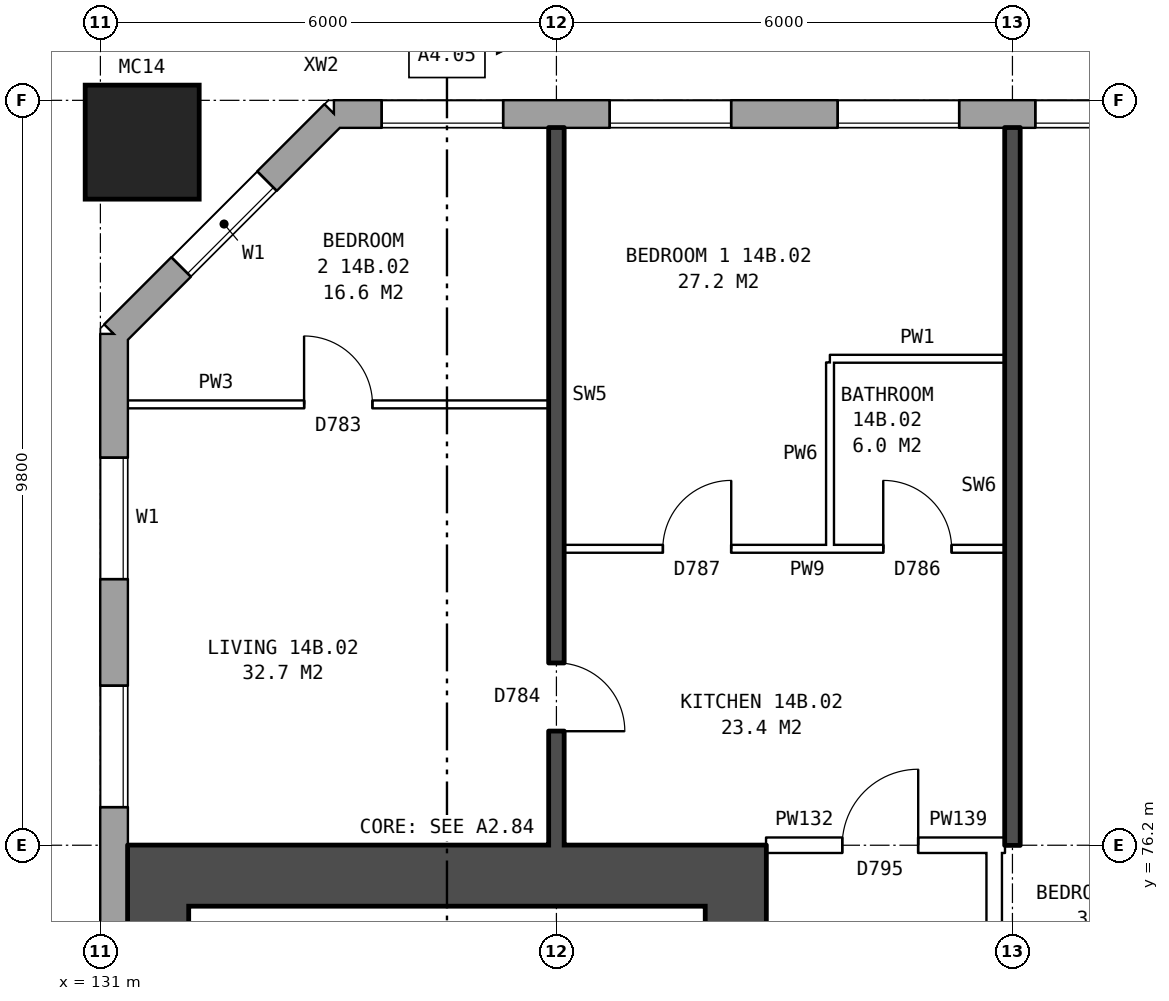
"""IFC4 building model, lengths in metres.
Left out: names, types, materials, properties, quantities, classifications, styles, units other than length and angle.
Written with IfcOpenShell. Run it as: python <this file> out.ifc"""

import sys

from ifc_helpers import new_model, si_unit, direction, frame, frame_2d, origin, origin_2d, place, context, subcontext, project, spatial, rectangle, hollow_rectangle, extrude, element, fill, save


model = new_model("IFC4")
c1 = context("Model", 3, precision=1e-05, world=origin(), true_north=direction((0.0, 1.0)))
c2 = subcontext(c1, "Body", "Model", "MODEL_VIEW")
j1 = project(units=[si_unit("LENGTHUNIT", "METRE"), si_unit("PLANEANGLEUNIT", "RADIAN")], contexts=[c1])
p1 = place(None, origin())
s1 = spatial("IfcSite", under=j1, at=p1, CompositionType="ELEMENT")
p2 = place(p1, origin())
s2 = spatial("IfcBuilding", under=s1, at=p2, CompositionType="ELEMENT")
p3 = place(p2, frame((0.0, 0.0, 53.6)))
s3 = spatial("IfcBuildingStorey", under=s2, at=p3, CompositionType="ELEMENT", Elevation=53.6)
p4 = place(p3, frame((131.55, 85.45, 0.0), z_axis=(0.0, 0.0, 1.0), x_axis=(1.0, 0.0, 0.0)))
e1 = element("IfcColumn", 1, at=p4, inside=s3, PredefinedType="COLUMN", context=c2, shape_type="SweptSolid", body=[
    extrude(hollow_rectangle(XDim=1.5, YDim=1.5, WallThickness=0.08, at=origin_2d()), origin(), (0.0, 0.0, 1.0), 3.1),
])
p5 = place(p3, frame((173.425, 85.82, 0.0), z_axis=(0.0, 0.0, 1.0), x_axis=(-1.0, 0.0, 0.0)))
e2 = element("IfcWall", 2, at=p5, inside=s3, PredefinedType="STANDARD", context=c2, shape_type="SweptSolid", body=[
    extrude(rectangle(XDim=39.351, YDim=0.36, at=frame_2d((19.675, 0.0))), origin(), (0.0, 0.0, 1.0), 2.85),
])
p6 = place(p5, frame((1.125, 0.0, 0.8)))
e3 = element("IfcOpeningElement", 3, at=p6, cuts=e2, PredefinedType="OPENING", context=c2, shape_type="SweptSolid", body=[
    extrude(rectangle(XDim=1.6, YDim=1.8, at=frame_2d((0.8, 0.9))), frame((0.0, 0.19, 0.0), z_axis=(0.0, -1.0, 0.0), x_axis=(1.0, 0.0, 0.0)), (0.0, 0.0, 1.0), 0.38),
])
p7 = place(p5, frame((4.125, 0.0, 0.8)))
e4 = element("IfcOpeningElement", 4, at=p7, cuts=e2, PredefinedType="OPENING", context=c2, shape_type="SweptSolid", body=[
    extrude(rectangle(XDim=1.6, YDim=1.8, at=frame_2d((0.8, 0.9))), frame((0.0, 0.19, 0.0), z_axis=(0.0, -1.0, 0.0), x_axis=(1.0, 0.0, 0.0)), (0.0, 0.0, 1.0), 0.38),
])
p8 = place(p5, frame((7.125, 0.0, 0.8)))
e5 = element("IfcOpeningElement", 5, at=p8, cuts=e2, PredefinedType="OPENING", context=c2, shape_type="SweptSolid", body=[
    extrude(rectangle(XDim=1.6, YDim=1.8, at=frame_2d((0.8, 0.9))), frame((0.0, 0.19, 0.0), z_axis=(0.0, -1.0, 0.0), x_axis=(1.0, 0.0, 0.0)), (0.0, 0.0, 1.0), 0.38),
])
p9 = place(p5, frame((9.625, 0.0, 1.65)))
e6 = element("IfcOpeningElement", 6, at=p9, cuts=e2, PredefinedType="OPENING", context=c2, shape_type="SweptSolid", body=[
    extrude(rectangle(XDim=0.6, YDim=0.9, at=frame_2d((0.3, 0.45))), frame((0.0, 0.19, 0.0), z_axis=(0.0, -1.0, 0.0), x_axis=(1.0, 0.0, 0.0)), (0.0, 0.0, 1.0), 0.38),
])
p10 = place(p5, frame((13.125, 0.0, 0.8)))
e7 = element("IfcOpeningElement", 7, at=p10, cuts=e2, PredefinedType="OPENING", context=c2, shape_type="SweptSolid", body=[
    extrude(rectangle(XDim=1.6, YDim=1.8, at=frame_2d((0.8, 0.9))), frame((0.0, 0.19, 0.0), z_axis=(0.0, -1.0, 0.0), x_axis=(1.0, 0.0, 0.0)), (0.0, 0.0, 1.0), 0.38),
])
p11 = place(p5, frame((16.125, 0.0, 0.8)))
e8 = element("IfcOpeningElement", 8, at=p11, cuts=e2, PredefinedType="OPENING", context=c2, shape_type="SweptSolid", body=[
    extrude(rectangle(XDim=1.6, YDim=1.8, at=frame_2d((0.8, 0.9))), frame((0.0, 0.19, 0.0), z_axis=(0.0, -1.0, 0.0), x_axis=(1.0, 0.0, 0.0)), (0.0, 0.0, 1.0), 0.38),
])
p12 = place(p5, frame((19.125, 0.0, 0.8)))
e9 = element("IfcOpeningElement", 9, at=p12, cuts=e2, PredefinedType="OPENING", context=c2, shape_type="SweptSolid", body=[
    extrude(rectangle(XDim=1.6, YDim=1.8, at=frame_2d((0.8, 0.9))), frame((0.0, 0.19, 0.0), z_axis=(0.0, -1.0, 0.0), x_axis=(1.0, 0.0, 0.0)), (0.0, 0.0, 1.0), 0.38),
])
p13 = place(p5, frame((22.125, 0.0, 0.8)))
e10 = element("IfcOpeningElement", 10, at=p13, cuts=e2, PredefinedType="OPENING", context=c2, shape_type="SweptSolid", body=[
    extrude(rectangle(XDim=1.6, YDim=1.8, at=frame_2d((0.8, 0.9))), frame((0.0, 0.19, 0.0), z_axis=(0.0, -1.0, 0.0), x_axis=(1.0, 0.0, 0.0)), (0.0, 0.0, 1.0), 0.38),
])
p14 = place(p5, frame((25.125, 0.0, 0.8)))
e11 = element("IfcOpeningElement", 11, at=p14, cuts=e2, PredefinedType="OPENING", context=c2, shape_type="SweptSolid", body=[
    extrude(rectangle(XDim=1.6, YDim=1.8, at=frame_2d((0.8, 0.9))), frame((0.0, 0.19, 0.0), z_axis=(0.0, -1.0, 0.0), x_axis=(1.0, 0.0, 0.0)), (0.0, 0.0, 1.0), 0.38),
])
p15 = place(p5, frame((27.575, 0.0, 0.15)))
e12 = element("IfcOpeningElement", 12, at=p15, cuts=e2, PredefinedType="OPENING", context=c2, shape_type="SweptSolid", body=[
    extrude(rectangle(XDim=1.0, YDim=0.9, at=frame_2d((0.5, 0.45))), frame((0.0, 0.19, 0.0), z_axis=(0.0, -1.0, 0.0), x_axis=(1.0, 0.0, 0.0)), (0.0, 0.0, 1.0), 0.38),
])
p16 = place(p5, frame((31.125, 0.0, 0.8)))
e13 = element("IfcOpeningElement", 13, at=p16, cuts=e2, PredefinedType="OPENING", context=c2, shape_type="SweptSolid", body=[
    extrude(rectangle(XDim=1.6, YDim=1.8, at=frame_2d((0.8, 0.9))), frame((0.0, 0.19, 0.0), z_axis=(0.0, -1.0, 0.0), x_axis=(1.0, 0.0, 0.0)), (0.0, 0.0, 1.0), 0.38),
])
p17 = place(p5, frame((34.125, 0.0, 0.8)))
e14 = element("IfcOpeningElement", 14, at=p17, cuts=e2, PredefinedType="OPENING", context=c2, shape_type="SweptSolid", body=[
    extrude(rectangle(XDim=1.6, YDim=1.8, at=frame_2d((0.8, 0.9))), frame((0.0, 0.19, 0.0), z_axis=(0.0, -1.0, 0.0), x_axis=(1.0, 0.0, 0.0)), (0.0, 0.0, 1.0), 0.38),
])
p18 = place(p5, frame((37.125, 0.0, 0.8)))
e15 = element("IfcOpeningElement", 15, at=p18, cuts=e2, PredefinedType="OPENING", context=c2, shape_type="SweptSolid", body=[
    extrude(rectangle(XDim=1.6, YDim=1.8, at=frame_2d((0.8, 0.9))), frame((0.0, 0.19, 0.0), z_axis=(0.0, -1.0, 0.0), x_axis=(1.0, 0.0, 0.0)), (0.0, 0.0, 1.0), 0.38),
])
p19 = place(p5, frame((10.975, 0.0, 0.35)))
e16 = element("IfcOpeningElement", 16, at=p19, cuts=e2, PredefinedType="OPENING", context=c2, shape_type="SweptSolid", body=[
    extrude(rectangle(XDim=1.2, YDim=0.9, at=frame_2d((0.6, 0.45))), frame((0.0, 0.19, 0.0), z_axis=(0.0, -1.0, 0.0), x_axis=(1.0, 0.0, 0.0)), (0.0, 0.0, 1.0), 0.38),
])
p20 = place(p5, frame((29.125, 0.0, 1.65)))
e17 = element("IfcOpeningElement", 17, at=p20, cuts=e2, PredefinedType="OPENING", context=c2, shape_type="SweptSolid", body=[
    extrude(rectangle(XDim=1.0, YDim=0.9, at=frame_2d((0.5, 0.45))), frame((0.0, 0.19, 0.0), z_axis=(0.0, -1.0, 0.0), x_axis=(1.0, 0.0, 0.0)), (0.0, 0.0, 1.0), 0.38),
])
p21 = place(p3, frame((134.075, 85.82, 0.0), z_axis=(0.0, 0.0, 1.0), x_axis=(-0.707106781187, -0.707106781187, 0.0)))
e18 = element("IfcWall", 18, at=p21, inside=s3, PredefinedType="STANDARD", context=c2, shape_type="SweptSolid", body=[
    extrude(rectangle(XDim=4.094, YDim=0.36, at=frame_2d((2.047, 0.0))), origin(), (0.0, 0.0, 1.0), 2.85),
])
p22 = place(p21, frame((1.247, 0.0, 0.8)))
e19 = element("IfcOpeningElement", 19, at=p22, cuts=e18, PredefinedType="OPENING", context=c2, shape_type="SweptSolid", body=[
    extrude(rectangle(XDim=1.6, YDim=1.8, at=frame_2d((0.8, 0.9))), frame((0.0, 0.19, 0.0), z_axis=(0.0, -1.0, 0.0), x_axis=(1.0, 0.0, 0.0)), (0.0, 0.0, 1.0), 0.38),
])
p23 = place(p3, frame((131.18, 82.925, 0.0), z_axis=(0.0, 0.0, 1.0), x_axis=(0.0, -1.0, 0.0)))
e20 = element("IfcWall", 20, at=p23, inside=s3, PredefinedType="STANDARD", context=c2, shape_type="SweptSolid", body=[
    extrude(rectangle(XDim=25.851, YDim=0.36, at=frame_2d((12.925, 0.0))), origin(), (0.0, 0.0, 1.0), 2.85),
])
p24 = place(p23, frame((1.625, 0.0, 0.8)))
e21 = element("IfcOpeningElement", 21, at=p24, cuts=e20, PredefinedType="OPENING", context=c2, shape_type="SweptSolid", body=[
    extrude(rectangle(XDim=1.6, YDim=1.8, at=frame_2d((0.8, 0.9))), frame((0.0, 0.19, 0.0), z_axis=(0.0, -1.0, 0.0), x_axis=(1.0, 0.0, 0.0)), (0.0, 0.0, 1.0), 0.38),
])
p25 = place(p23, frame((4.625, 0.0, 0.8)))
e22 = element("IfcOpeningElement", 22, at=p25, cuts=e20, PredefinedType="OPENING", context=c2, shape_type="SweptSolid", body=[
    extrude(rectangle(XDim=1.6, YDim=1.8, at=frame_2d((0.8, 0.9))), frame((0.0, 0.19, 0.0), z_axis=(0.0, -1.0, 0.0), x_axis=(1.0, 0.0, 0.0)), (0.0, 0.0, 1.0), 0.38),
])
p26 = place(p23, frame((19.625, 0.0, 0.8)))
e23 = element("IfcOpeningElement", 23, at=p26, cuts=e20, PredefinedType="OPENING", context=c2, shape_type="SweptSolid", body=[
    extrude(rectangle(XDim=1.6, YDim=1.8, at=frame_2d((0.8, 0.9))), frame((0.0, 0.19, 0.0), z_axis=(0.0, -1.0, 0.0), x_axis=(1.0, 0.0, 0.0)), (0.0, 0.0, 1.0), 0.38),
])
p27 = place(p23, frame((22.625, 0.0, 0.8)))
e24 = element("IfcOpeningElement", 24, at=p27, cuts=e20, PredefinedType="OPENING", context=c2, shape_type="SweptSolid", body=[
    extrude(rectangle(XDim=1.6, YDim=1.8, at=frame_2d((0.8, 0.9))), frame((0.0, 0.19, 0.0), z_axis=(0.0, -1.0, 0.0), x_axis=(1.0, 0.0, 0.0)), (0.0, 0.0, 1.0), 0.38),
])
p28 = place(p3, frame((139.36, 64.6, 0.0), z_axis=(0.0, 0.0, 1.0), x_axis=(0.0, 1.0, 0.0)))
e25 = element("IfcWall", 25, at=p28, inside=s3, PredefinedType="SHEAR", context=c2, shape_type="SweptSolid", body=[
    extrude(rectangle(XDim=10.8, YDim=0.8, at=frame_2d((5.4, 0.0))), origin(), (0.0, 0.0, 1.0), 2.85),
])
p29 = place(p28, frame((0.525, 0.0, 0.0)))
e26 = element("IfcOpeningElement", 26, at=p29, cuts=e25, PredefinedType="OPENING", context=c2, shape_type="SweptSolid", body=[
    extrude(rectangle(XDim=1.1, YDim=2.1, at=frame_2d((0.55, 1.05))), frame((0.0, 0.41, 0.0), z_axis=(0.0, -1.0, 0.0), x_axis=(1.0, 0.0, 0.0)), (0.0, 0.0, 1.0), 0.82),
])
p30 = place(p28, frame((9.1, 0.0, 0.0)))
e27 = element("IfcOpeningElement", 27, at=p30, cuts=e25, PredefinedType="OPENING", context=c2, shape_type="SweptSolid", body=[
    extrude(rectangle(XDim=1.1, YDim=2.1, at=frame_2d((0.55, 1.05))), frame((0.0, 0.41, 0.0), z_axis=(0.0, -1.0, 0.0), x_axis=(1.0, 0.0, 0.0)), (0.0, 0.0, 1.0), 0.82),
])
p31 = place(p28, frame((7.325, 0.0, 0.0)))
e28 = element("IfcOpeningElement", 28, at=p31, cuts=e25, PredefinedType="OPENING", context=c2, shape_type="SweptSolid", body=[
    extrude(rectangle(XDim=0.85, YDim=2.1, at=frame_2d((0.425, 1.05))), frame((0.0, 0.41, 0.0), z_axis=(0.0, -1.0, 0.0), x_axis=(1.0, 0.0, 0.0)), (0.0, 0.0, 1.0), 0.82),
])
p32 = place(p3, frame((131.76, 64.6, 0.0), z_axis=(0.0, 0.0, 1.0), x_axis=(0.0, 1.0, 0.0)))
e29 = element("IfcWall", 29, at=p32, inside=s3, PredefinedType="SHEAR", context=c2, shape_type="SweptSolid", body=[
    extrude(rectangle(XDim=10.8, YDim=0.8, at=frame_2d((5.4, 0.0))), origin(), (0.0, 0.0, 1.0), 2.85),
])
p33 = place(p3, frame((139.76, 75.8, 0.0), z_axis=(0.0, 0.0, 1.0), x_axis=(-1.0, 0.0, 0.0)))
e30 = element("IfcWall", 30, at=p33, inside=s3, PredefinedType="SHEAR", context=c2, shape_type="SweptSolid", body=[
    extrude(rectangle(XDim=8.4, YDim=0.8, at=frame_2d((4.2, 0.0))), origin(), (0.0, 0.0, 1.0), 2.85),
])
p34 = place(p3, frame((142.76, 63.9, 0.0), z_axis=(0.0, 0.0, 1.0), x_axis=(0.0, 1.0, 0.0)))
e31 = element("IfcWall", 31, at=p34, inside=s3, PredefinedType="PARTITIONING", context=c2, shape_type="SweptSolid", body=[
    extrude(rectangle(XDim=12.2, YDim=0.2, at=frame_2d((6.1, 0.0))), origin(), (0.0, 0.0, 1.0), 2.85),
])
p35 = place(p34, frame((5.1, 0.0, 0.0)))
e32 = element("IfcOpeningElement", 32, at=p35, cuts=e31, PredefinedType="OPENING", context=c2, shape_type="SweptSolid", body=[
    extrude(rectangle(XDim=2.0, YDim=2.1, at=frame_2d((1.0, 1.05))), frame((0.0, 0.11, 0.0), z_axis=(0.0, -1.0, 0.0), x_axis=(1.0, 0.0, 0.0)), (0.0, 0.0, 1.0), 0.22),
])
p36 = place(p3, frame((139.76, 76.2, 0.0), z_axis=(0.0, 0.0, 1.0), x_axis=(1.0, 0.0, 0.0)))
e33 = element("IfcWall", 33, at=p36, inside=s3, PredefinedType="PARTITIONING", context=c2, shape_type="SweptSolid", body=[
    extrude(rectangle(XDim=3.0, YDim=0.2, at=frame_2d((1.5, 0.0))), origin(), (0.0, 0.0, 1.0), 2.85),
])
p37 = place(p36, frame((1.0, 0.0, 0.0)))
e34 = element("IfcOpeningElement", 34, at=p37, cuts=e33, PredefinedType="OPENING", context=c2, shape_type="SweptSolid", body=[
    extrude(rectangle(XDim=1.0, YDim=2.1, at=frame_2d((0.5, 1.05))), frame((0.0, 0.11, 0.0), z_axis=(0.0, -1.0, 0.0), x_axis=(1.0, 0.0, 0.0)), (0.0, 0.0, 1.0), 0.22),
])
p38 = place(p3, frame((142.76, 76.2, 0.0), z_axis=(0.0, 0.0, 1.0), x_axis=(1.0, 0.0, 0.0)))
e35 = element("IfcWall", 35, at=p38, inside=s3, PredefinedType="PARTITIONING", context=c2, shape_type="SweptSolid", body=[
    extrude(rectangle(XDim=0.14, YDim=0.2, at=frame_2d((0.07, 0.0))), origin(), (0.0, 0.0, 1.0), 2.85),
])
p39 = place(p3, frame((137.1, 80.1, 0.0), z_axis=(0.0, 0.0, 1.0), x_axis=(1.0, 0.0, 0.0)))
e36 = element("IfcWall", 36, at=p39, inside=s3, PredefinedType="PARTITIONING", context=c2, shape_type="SweptSolid", body=[
    extrude(rectangle(XDim=5.8, YDim=0.1, at=frame_2d((2.9, 0.0))), origin(), (0.0, 0.0, 1.0), 2.85),
])
p40 = place(p39, frame((1.3, 0.0, 0.0)))
e37 = element("IfcOpeningElement", 37, at=p40, cuts=e36, PredefinedType="OPENING", context=c2, shape_type="SweptSolid", body=[
    extrude(rectangle(XDim=0.9, YDim=2.1, at=frame_2d((0.45, 1.05))), frame((0.0, 0.06, 0.0), z_axis=(0.0, -1.0, 0.0), x_axis=(1.0, 0.0, 0.0)), (0.0, 0.0, 1.0), 0.12),
])
p41 = place(p39, frame((4.2, 0.0, 0.0)))
e38 = element("IfcOpeningElement", 38, at=p41, cuts=e36, PredefinedType="OPENING", context=c2, shape_type="SweptSolid", body=[
    extrude(rectangle(XDim=0.9, YDim=2.1, at=frame_2d((0.45, 1.05))), frame((0.0, 0.06, 0.0), z_axis=(0.0, -1.0, 0.0), x_axis=(1.0, 0.0, 0.0)), (0.0, 0.0, 1.0), 0.12),
])
p42 = place(p3, frame((131.36, 82.0, 0.0), z_axis=(0.0, 0.0, 1.0), x_axis=(1.0, 0.0, 0.0)))
e39 = element("IfcWall", 39, at=p42, inside=s3, PredefinedType="PARTITIONING", context=c2, shape_type="SweptSolid", body=[
    extrude(rectangle(XDim=5.54, YDim=0.1, at=frame_2d((2.77, 0.0))), origin(), (0.0, 0.0, 1.0), 2.85),
])
p43 = place(p42, frame((2.32, 0.0, 0.0)))
e40 = element("IfcOpeningElement", 40, at=p43, cuts=e39, PredefinedType="OPENING", context=c2, shape_type="SweptSolid", body=[
    extrude(rectangle(XDim=0.9, YDim=2.1, at=frame_2d((0.45, 1.05))), frame((0.0, 0.06, 0.0), z_axis=(0.0, -1.0, 0.0), x_axis=(1.0, 0.0, 0.0)), (0.0, 0.0, 1.0), 0.12),
])
p44 = place(p3, frame((140.6, 82.6, 0.0), z_axis=(0.0, 0.0, 1.0), x_axis=(1.0, 0.0, 0.0)))
e41 = element("IfcWall", 41, at=p44, inside=s3, PredefinedType="PARTITIONING", context=c2, shape_type="SweptSolid", body=[
    extrude(rectangle(XDim=2.3, YDim=0.1, at=frame_2d((1.15, 0.0))), origin(), (0.0, 0.0, 1.0), 2.85),
])
p45 = place(p3, frame((137.0, 76.2, 0.0), z_axis=(0.0, 0.0, 1.0), x_axis=(0.0, 1.0, 0.0)))
e42 = element("IfcWall", 42, at=p45, inside=s3, PredefinedType="SOLIDWALL", context=c2, shape_type="SweptSolid", body=[
    extrude(rectangle(XDim=9.44, YDim=0.2, at=frame_2d((4.72, 0.0))), origin(), (0.0, 0.0, 1.0), 2.85),
])
p46 = place(p45, frame((1.5, 0.0, 0.0)))
e43 = element("IfcOpeningElement", 43, at=p46, cuts=e42, PredefinedType="OPENING", context=c2, shape_type="SweptSolid", body=[
    extrude(rectangle(XDim=0.9, YDim=2.1, at=frame_2d((0.45, 1.05))), frame((0.0, 0.11, 0.0), z_axis=(0.0, -1.0, 0.0), x_axis=(1.0, 0.0, 0.0)), (0.0, 0.0, 1.0), 0.22),
])
p47 = place(p3, frame((140.6, 80.15, 0.0), z_axis=(0.0, 0.0, 1.0), x_axis=(0.0, 1.0, 0.0)))
e44 = element("IfcWall", 44, at=p47, inside=s3, PredefinedType="PARTITIONING", context=c2, shape_type="SweptSolid", body=[
    extrude(rectangle(XDim=2.4, YDim=0.1, at=frame_2d((1.2, 0.0))), origin(), (0.0, 0.0, 1.0), 2.85),
])
p48 = place(p3, frame((143.0, 76.2, 0.0), z_axis=(0.0, 0.0, 1.0), x_axis=(0.0, 1.0, 0.0)))
e45 = element("IfcWall", 45, at=p48, inside=s3, PredefinedType="SOLIDWALL", context=c2, shape_type="SweptSolid", body=[
    extrude(rectangle(XDim=9.44, YDim=0.2, at=frame_2d((4.72, 0.0))), origin(), (0.0, 0.0, 1.0), 2.85),
])
p49 = place(p16, origin())
e46 = element("IfcWindow", 46, at=p49, inside=s3, PartitioningType="SINGLE_PANEL", PredefinedType="WINDOW", context=c2, shape_type="SweptSolid", body=[
    extrude(rectangle(XDim=1.6, YDim=1.8, at=frame_2d((0.8, 0.9))), frame((0.0, 0.15, 0.0), z_axis=(0.0, -1.0, 0.0), x_axis=(1.0, 0.0, 0.0)), (0.0, 0.0, 1.0), 0.06),
])
fill(e13, e46)
p50 = place(p17, origin())
e47 = element("IfcWindow", 47, at=p50, inside=s3, PartitioningType="SINGLE_PANEL", PredefinedType="WINDOW", context=c2, shape_type="SweptSolid", body=[
    extrude(rectangle(XDim=1.6, YDim=1.8, at=frame_2d((0.8, 0.9))), frame((0.0, 0.15, 0.0), z_axis=(0.0, -1.0, 0.0), x_axis=(1.0, 0.0, 0.0)), (0.0, 0.0, 1.0), 0.06),
])
fill(e14, e47)
p51 = place(p18, origin())
e48 = element("IfcWindow", 48, at=p51, inside=s3, PartitioningType="SINGLE_PANEL", PredefinedType="WINDOW", context=c2, shape_type="SweptSolid", body=[
    extrude(rectangle(XDim=1.6, YDim=1.8, at=frame_2d((0.8, 0.9))), frame((0.0, 0.15, 0.0), z_axis=(0.0, -1.0, 0.0), x_axis=(1.0, 0.0, 0.0)), (0.0, 0.0, 1.0), 0.06),
])
fill(e15, e48)
p52 = place(p22, origin())
e49 = element("IfcWindow", 49, at=p52, inside=s3, PartitioningType="SINGLE_PANEL", PredefinedType="WINDOW", context=c2, shape_type="SweptSolid", body=[
    extrude(rectangle(XDim=1.6, YDim=1.8, at=frame_2d((0.8, 0.9))), frame((0.0, 0.15, 0.0), z_axis=(0.0, -1.0, 0.0), x_axis=(1.0, 0.0, 0.0)), (0.0, 0.0, 1.0), 0.06),
])
fill(e19, e49)
p53 = place(p24, origin())
e50 = element("IfcWindow", 50, at=p53, inside=s3, PartitioningType="SINGLE_PANEL", PredefinedType="WINDOW", context=c2, shape_type="SweptSolid", body=[
    extrude(rectangle(XDim=1.6, YDim=1.8, at=frame_2d((0.8, 0.9))), frame((0.0, 0.15, 0.0), z_axis=(0.0, -1.0, 0.0), x_axis=(1.0, 0.0, 0.0)), (0.0, 0.0, 1.0), 0.06),
])
fill(e21, e50)
p54 = place(p25, origin())
e51 = element("IfcWindow", 51, at=p54, inside=s3, PartitioningType="SINGLE_PANEL", PredefinedType="WINDOW", context=c2, shape_type="SweptSolid", body=[
    extrude(rectangle(XDim=1.6, YDim=1.8, at=frame_2d((0.8, 0.9))), frame((0.0, 0.15, 0.0), z_axis=(0.0, -1.0, 0.0), x_axis=(1.0, 0.0, 0.0)), (0.0, 0.0, 1.0), 0.06),
])
fill(e22, e51)
p55 = place(p40, origin())
e52 = element("IfcDoor", 52, at=p55, inside=s3, OperationType="SINGLE_SWING_RIGHT", PredefinedType="DOOR", context=c2, shape_type="SweptSolid", body=[
    extrude(rectangle(XDim=0.9, YDim=2.1, at=frame_2d((0.45, 1.05))), frame((0.0, 0.025, 0.0), z_axis=(0.0, -1.0, 0.0), x_axis=(1.0, 0.0, 0.0)), (0.0, 0.0, 1.0), 0.05),
])
fill(e37, e52)
p56 = place(p43, origin())
e53 = element("IfcDoor", 53, at=p56, inside=s3, OperationType="SINGLE_SWING_LEFT", PredefinedType="DOOR", context=c2, shape_type="SweptSolid", body=[
    extrude(rectangle(XDim=0.9, YDim=2.1, at=frame_2d((0.45, 1.05))), frame((0.0, 0.025, 0.0), z_axis=(0.0, -1.0, 0.0), x_axis=(1.0, 0.0, 0.0)), (0.0, 0.0, 1.0), 0.05),
])
fill(e40, e53)
p57 = place(p37, origin())
e54 = element("IfcDoor", 54, at=p57, inside=s3, OperationType="SINGLE_SWING_RIGHT", PredefinedType="DOOR", context=c2, shape_type="SweptSolid", body=[
    extrude(rectangle(XDim=1.0, YDim=2.1, at=frame_2d((0.5, 1.05))), frame((0.0, 0.025, 0.0), z_axis=(0.0, -1.0, 0.0), x_axis=(1.0, 0.0, 0.0)), (0.0, 0.0, 1.0), 0.05),
])
fill(e34, e54)
p58 = place(p46, frame((0.9, 0.0, 0.0), z_axis=(0.0, 0.0, 1.0), x_axis=(-1.0, 0.0, 0.0)))
e55 = element("IfcDoor", 55, at=p58, inside=s3, OperationType="SINGLE_SWING_RIGHT", PredefinedType="DOOR", context=c2, shape_type="SweptSolid", body=[
    extrude(rectangle(XDim=0.9, YDim=2.1, at=frame_2d((0.45, 1.05))), frame((0.0, 0.025, 0.0), z_axis=(0.0, -1.0, 0.0), x_axis=(1.0, 0.0, 0.0)), (0.0, 0.0, 1.0), 0.05),
])
fill(e43, e55)
p59 = place(p41, origin())
e56 = element("IfcDoor", 56, at=p59, inside=s3, OperationType="SINGLE_SWING_LEFT", PredefinedType="DOOR", context=c2, shape_type="SweptSolid", body=[
    extrude(rectangle(XDim=0.9, YDim=2.1, at=frame_2d((0.45, 1.05))), frame((0.0, 0.025, 0.0), z_axis=(0.0, -1.0, 0.0), x_axis=(1.0, 0.0, 0.0)), (0.0, 0.0, 1.0), 0.05),
])
fill(e38, e56)
p60 = place(p20, origin())
e57 = element("IfcWindow", 57, at=p60, inside=s3, PartitioningType="SINGLE_PANEL", PredefinedType="WINDOW", context=c2, shape_type="SweptSolid", body=[
    extrude(rectangle(XDim=1.0, YDim=0.9, at=frame_2d((0.5, 0.45))), frame((0.0, 0.15, 0.0), z_axis=(0.0, -1.0, 0.0), x_axis=(1.0, 0.0, 0.0)), (0.0, 0.0, 1.0), 0.06),
])
fill(e17, e57)
save(model, sys.argv[1])
